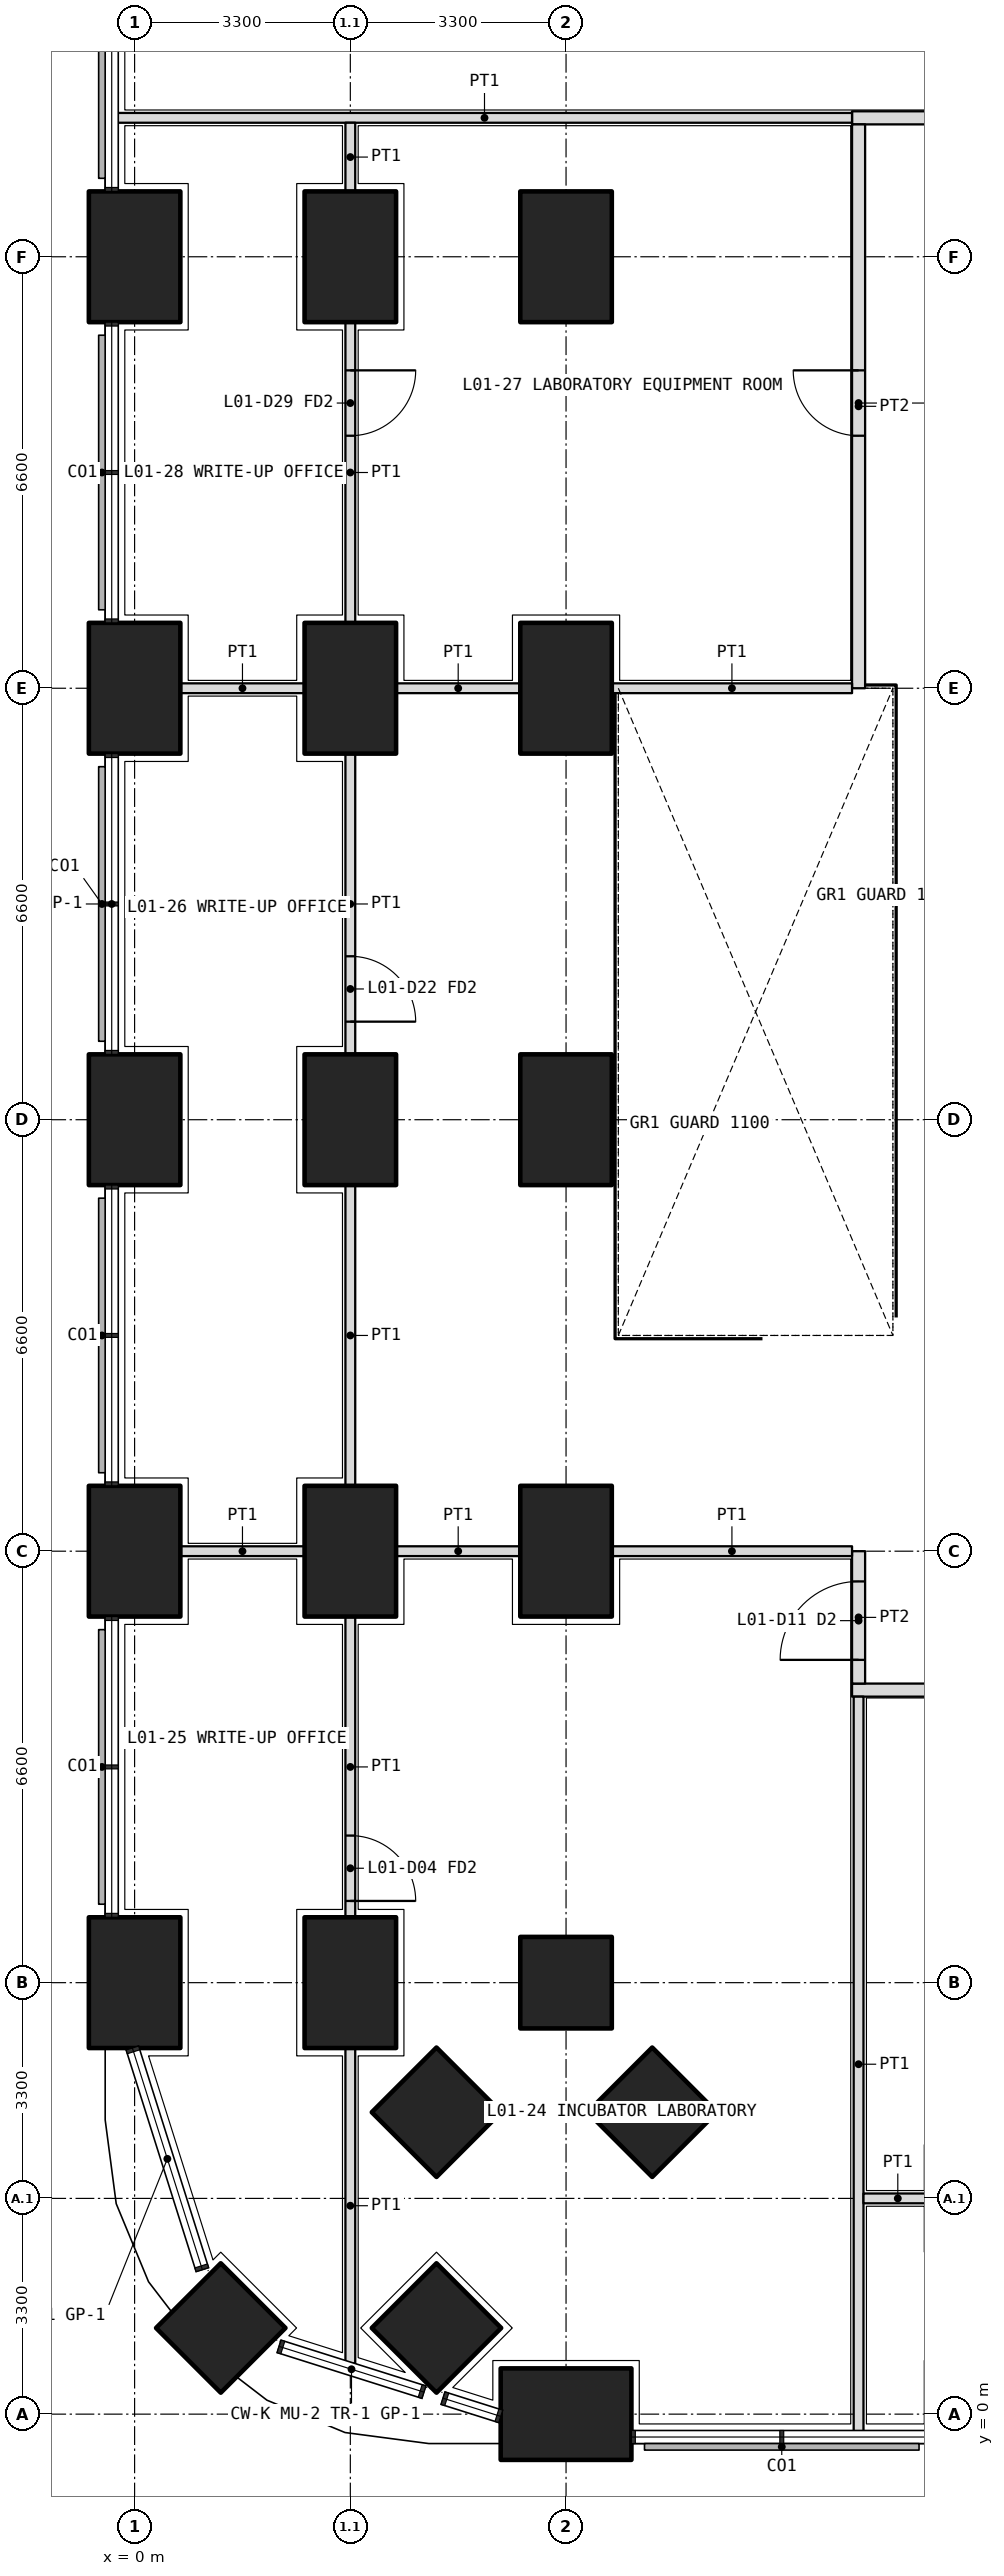
"""IFC4 building model, lengths in metres.
Left out: names, types, materials, properties, quantities, classifications, styles, units other than length and angle.
Written with IfcOpenShell. Run it as: python <this file> out.ifc"""

import sys

from ifc_helpers import new_model, si_unit, direction, frame, frame_2d, origin, origin_2d, place, context, subcontext, project, spatial, rectangle, extrude, element, fill, save


model = new_model("IFC4")
c1 = context("Model", 3, precision=1e-05, world=origin(), true_north=direction((0.0, 1.0)))
c2 = subcontext(c1, "Body", "Model", "MODEL_VIEW")
j1 = project(units=[si_unit("LENGTHUNIT", "METRE"), si_unit("PLANEANGLEUNIT", "RADIAN")], contexts=[c1])
p1 = place(None, origin())
s1 = spatial("IfcSite", under=j1, at=p1, CompositionType="ELEMENT")
p2 = place(p1, origin())
s2 = spatial("IfcBuilding", under=s1, at=p2, CompositionType="ELEMENT")
p3 = place(p2, frame((0.0, 0.0, 7.2)))
s3 = spatial("IfcBuildingStorey", under=s2, at=p3, CompositionType="ELEMENT", Elevation=7.2)
p4 = place(p3, frame((1.318, 1.318, 0.0), z_axis=(0.0, 0.0, 1.0), x_axis=(0.707106781187, 0.707106781187, 0.0)))
e1 = element("IfcColumn", 1, at=p4, inside=s3, PredefinedType="COLUMN", context=c2, shape_type="SweptSolid", body=[
    extrude(rectangle(XDim=1.4, YDim=1.4, at=origin_2d()), origin(), (0.0, 0.0, 1.0), 5.4),
])
for number, where, z_axis, x_axis in (
    (2, (6.6, 0.0, 0.0), (0.0, 0.0, 1.0), (1.0, 0.0, 0.0)),
    (3, (0.0, 6.6, 0.0), (0.0, 0.0, 1.0), (0.0, 1.0, 0.0)),
    (4, (0.0, 13.2, 0.0), (0.0, 0.0, 1.0), (0.0, 1.0, 0.0)),
    (5, (0.0, 19.8, 0.0), (0.0, 0.0, 1.0), (0.0, 1.0, 0.0)),
    (6, (0.0, 26.4, 0.0), (0.0, 0.0, 1.0), (0.0, 1.0, 0.0)),
    (7, (0.0, 33.0, 0.0), (0.0, 0.0, 1.0), (0.0, 1.0, 0.0)),
):
    element("IfcColumn", number, at=place(p3, frame(where, z_axis=z_axis, x_axis=x_axis)), inside=s3, PredefinedType="COLUMN", context=c2, shape_type="SweptSolid", body=[
        extrude(rectangle(XDim=2.0, YDim=1.4, at=origin_2d()), origin(), (0.0, 0.0, 1.0), 5.4),
    ])
for number, where, z_axis, x_axis in (
    (8, (6.6, 6.6, 0.0), (0.0, 0.0, 1.0), (1.0, 0.0, 0.0)),
    (9, (4.618, 1.318, 0.0), (0.0, 0.0, 1.0), (0.707, 0.707, 0.0)),
):
    element("IfcColumn", number, at=place(p3, frame(where, z_axis=z_axis, x_axis=x_axis)), inside=s3, PredefinedType="COLUMN", context=c2, shape_type="SweptSolid", body=[
        extrude(rectangle(XDim=1.4, YDim=1.4, at=origin_2d()), origin(), (0.0, 0.0, 1.0), 5.4),
    ])
for number, where, z_axis, x_axis in (
    (10, (3.3, 6.6, 0.0), (0.0, 0.0, 1.0), (0.0, 1.0, 0.0)),
    (11, (3.3, 13.2, 0.0), (0.0, 0.0, 1.0), (0.0, 1.0, 0.0)),
    (12, (3.3, 19.8, 0.0), (0.0, 0.0, 1.0), (0.0, 1.0, 0.0)),
    (13, (3.3, 26.4, 0.0), (0.0, 0.0, 1.0), (0.0, 1.0, 0.0)),
    (14, (3.3, 33.0, 0.0), (0.0, 0.0, 1.0), (0.0, 1.0, 0.0)),
):
    element("IfcColumn", number, at=place(p3, frame(where, z_axis=z_axis, x_axis=x_axis)), inside=s3, PredefinedType="COLUMN", context=c2, shape_type="SweptSolid", body=[
        extrude(rectangle(XDim=2.0, YDim=1.4, at=origin_2d()), origin(), (0.0, 0.0, 1.0), 5.4),
    ])
for number, where, z_axis, x_axis in (
    (15, (4.618, 4.618, 0.0), (0.0, 0.0, 1.0), (0.707, 0.707, 0.0)),
    (16, (7.918, 4.618, 0.0), (0.0, 0.0, 1.0), (0.707, 0.707, 0.0)),
):
    element("IfcColumn", number, at=place(p3, frame(where, z_axis=z_axis, x_axis=x_axis)), inside=s3, PredefinedType="COLUMN", context=c2, shape_type="SweptSolid", body=[
        extrude(rectangle(XDim=1.4, YDim=1.4, at=origin_2d()), origin(), (0.0, 0.0, 1.0), 5.4),
    ])
for number, where, z_axis, x_axis in (
    (17, (6.6, 13.2, 0.0), (0.0, 0.0, 1.0), (0.0, 1.0, 0.0)),
    (18, (6.6, 19.8, 0.0), (0.0, 0.0, 1.0), (0.0, 1.0, 0.0)),
    (19, (6.6, 26.4, 0.0), (0.0, 0.0, 1.0), (0.0, 1.0, 0.0)),
    (20, (6.6, 33.0, 0.0), (0.0, 0.0, 1.0), (0.0, 1.0, 0.0)),
):
    element("IfcColumn", number, at=place(p3, frame(where, z_axis=z_axis, x_axis=x_axis)), inside=s3, PredefinedType="COLUMN", context=c2, shape_type="SweptSolid", body=[
        extrude(rectangle(XDim=2.0, YDim=1.4, at=origin_2d()), origin(), (0.0, 0.0, 1.0), 5.4),
    ])
p5 = place(p3, frame((10.975, 11.075, 0.0), z_axis=(0.0, 0.0, 1.0), x_axis=(1.0, 0.0, 0.0)))
e21 = element("IfcWall", 21, at=p5, inside=s3, PredefinedType="PARTITIONING", context=c2, shape_type="SweptSolid", body=[
    extrude(rectangle(XDim=30.85, YDim=0.2, at=frame_2d((15.425, 0.0))), origin(), (0.0, 0.0, 1.0), 4.05),
])
p6 = place(p5, frame((3.863, 0.0, 0.0)))
e22 = element("IfcOpeningElement", 22, at=p6, cuts=e21, PredefinedType="OPENING", context=c2, shape_type="SweptSolid", body=[
    extrude(rectangle(XDim=1.2, YDim=2.1, at=frame_2d((0.6, 1.05))), frame((0.0, 0.11, 0.0), z_axis=(0.0, -1.0, 0.0), x_axis=(1.0, 0.0, 0.0)), (0.0, 0.0, 1.0), 0.22),
])
p7 = place(p5, frame((9.375, 0.0, 0.0)))
e23 = element("IfcOpeningElement", 23, at=p7, cuts=e21, PredefinedType="OPENING", context=c2, shape_type="SweptSolid", body=[
    extrude(rectangle(XDim=1.0, YDim=2.1, at=frame_2d((0.5, 1.05))), frame((0.0, 0.11, 0.0), z_axis=(0.0, -1.0, 0.0), x_axis=(1.0, 0.0, 0.0)), (0.0, 0.0, 1.0), 0.22),
])
p8 = place(p5, frame((12.475, 0.0, 0.0)))
e24 = element("IfcOpeningElement", 24, at=p8, cuts=e21, PredefinedType="OPENING", context=c2, shape_type="SweptSolid", body=[
    extrude(rectangle(XDim=0.9, YDim=2.1, at=frame_2d((0.45, 1.05))), frame((0.0, 0.11, 0.0), z_axis=(0.0, -1.0, 0.0), x_axis=(1.0, 0.0, 0.0)), (0.0, 0.0, 1.0), 0.22),
])
p9 = place(p5, frame((16.375, 0.0, 0.0)))
e25 = element("IfcOpeningElement", 25, at=p9, cuts=e21, PredefinedType="OPENING", context=c2, shape_type="SweptSolid", body=[
    extrude(rectangle(XDim=0.9, YDim=2.1, at=frame_2d((0.45, 1.05))), frame((0.0, 0.11, 0.0), z_axis=(0.0, -1.0, 0.0), x_axis=(1.0, 0.0, 0.0)), (0.0, 0.0, 1.0), 0.22),
])
p10 = place(p5, frame((19.775, 0.0, 0.0)))
e26 = element("IfcOpeningElement", 26, at=p10, cuts=e21, PredefinedType="OPENING", context=c2, shape_type="SweptSolid", body=[
    extrude(rectangle(XDim=1.2, YDim=2.1, at=frame_2d((0.6, 1.05))), frame((0.0, 0.11, 0.0), z_axis=(0.0, -1.0, 0.0), x_axis=(1.0, 0.0, 0.0)), (0.0, 0.0, 1.0), 0.22),
])
p11 = place(p5, frame((25.887, 0.0, 0.0)))
e27 = element("IfcOpeningElement", 27, at=p11, cuts=e21, PredefinedType="OPENING", context=c2, shape_type="SweptSolid", body=[
    extrude(rectangle(XDim=1.0, YDim=2.1, at=frame_2d((0.5, 1.05))), frame((0.0, 0.11, 0.0), z_axis=(0.0, -1.0, 0.0), x_axis=(1.0, 0.0, 0.0)), (0.0, 0.0, 1.0), 0.22),
])
p12 = place(p3, frame((10.975, 35.125, 0.0), z_axis=(0.0, 0.0, 1.0), x_axis=(1.0, 0.0, 0.0)))
e28 = element("IfcWall", 28, at=p12, inside=s3, PredefinedType="PARTITIONING", context=c2, shape_type="SweptSolid", body=[
    extrude(rectangle(XDim=30.85, YDim=0.2, at=frame_2d((15.425, 0.0))), origin(), (0.0, 0.0, 1.0), 4.05),
])
p13 = place(p12, frame((3.962, 0.0, 0.0)))
e29 = element("IfcOpeningElement", 29, at=p13, cuts=e28, PredefinedType="OPENING", context=c2, shape_type="SweptSolid", body=[
    extrude(rectangle(XDim=1.0, YDim=2.1, at=frame_2d((0.5, 1.05))), frame((0.0, 0.11, 0.0), z_axis=(0.0, -1.0, 0.0), x_axis=(1.0, 0.0, 0.0)), (0.0, 0.0, 1.0), 0.22),
])
p14 = place(p12, frame((14.825, 0.0, 0.0)))
e30 = element("IfcOpeningElement", 30, at=p14, cuts=e28, PredefinedType="OPENING", context=c2, shape_type="SweptSolid", body=[
    extrude(rectangle(XDim=1.2, YDim=2.1, at=frame_2d((0.6, 1.05))), frame((0.0, 0.11, 0.0), z_axis=(0.0, -1.0, 0.0), x_axis=(1.0, 0.0, 0.0)), (0.0, 0.0, 1.0), 0.22),
])
p15 = place(p12, frame((25.887, 0.0, 0.0)))
e31 = element("IfcOpeningElement", 31, at=p15, cuts=e28, PredefinedType="OPENING", context=c2, shape_type="SweptSolid", body=[
    extrude(rectangle(XDim=1.0, YDim=2.1, at=frame_2d((0.5, 1.05))), frame((0.0, 0.11, 0.0), z_axis=(0.0, -1.0, 0.0), x_axis=(1.0, 0.0, 0.0)), (0.0, 0.0, 1.0), 0.22),
])
p16 = place(p3, frame((11.075, 11.175, 0.0), z_axis=(0.0, 0.0, 1.0), x_axis=(0.0, 1.0, 0.0)))
e32 = element("IfcWall", 32, at=p16, inside=s3, PredefinedType="PARTITIONING", context=c2, shape_type="SweptSolid", body=[
    extrude(rectangle(XDim=2.025, YDim=0.2, at=frame_2d((1.012, 0.0))), origin(), (0.0, 0.0, 1.0), 4.05),
])
p17 = place(p16, frame((0.363, 0.0, 0.0)))
e33 = element("IfcOpeningElement", 33, at=p17, cuts=e32, PredefinedType="OPENING", context=c2, shape_type="SweptSolid", body=[
    extrude(rectangle(XDim=1.2, YDim=2.1, at=frame_2d((0.6, 1.05))), frame((0.0, 0.11, 0.0), z_axis=(0.0, -1.0, 0.0), x_axis=(1.0, 0.0, 0.0)), (0.0, 0.0, 1.0), 0.22),
])
p18 = place(p3, frame((11.075, 26.4, 0.0), z_axis=(0.0, 0.0, 1.0), x_axis=(0.0, 1.0, 0.0)))
e34 = element("IfcWall", 34, at=p18, inside=s3, PredefinedType="PARTITIONING", context=c2, shape_type="SweptSolid", body=[
    extrude(rectangle(XDim=8.625, YDim=0.2, at=frame_2d((4.312, 0.0))), origin(), (0.0, 0.0, 1.0), 4.05),
])
p19 = place(p18, frame((3.863, 0.0, 0.0)))
e35 = element("IfcOpeningElement", 35, at=p19, cuts=e34, PredefinedType="OPENING", context=c2, shape_type="SweptSolid", body=[
    extrude(rectangle(XDim=1.0, YDim=2.1, at=frame_2d((0.5, 1.05))), frame((0.0, 0.11, 0.0), z_axis=(0.0, -1.0, 0.0), x_axis=(1.0, 0.0, 0.0)), (0.0, 0.0, 1.0), 0.22),
])
for number, where, z_axis, x_axis in (
    (36, (11.075, -0.27, 0.0), (0.0, 0.0, 1.0), (0.0, 1.0, 0.0)),
    (37, (-0.27, 35.125, 0.0), (0.0, 0.0, 1.0), (1.0, 0.0, 0.0)),
):
    element("IfcWall", number, at=place(p3, frame(where, z_axis=z_axis, x_axis=x_axis)), inside=s3, PredefinedType="PARTITIONING", context=c2, shape_type="SweptSolid", body=[
        extrude(rectangle(XDim=11.245, YDim=0.15, at=frame_2d((5.623, 0.0))), origin(), (0.0, 0.0, 1.0), 3.9),
    ])
for number, where, z_axis, x_axis in (
    (38, (11.15, 3.3, 0.0), (0.0, 0.0, 1.0), (1.0, 0.0, 0.0)),
    (39, (3.3, 35.05, 0.0), (0.0, 0.0, 1.0), (0.0, -1.0, 0.0)),
):
    element("IfcWall", number, at=place(p3, frame(where, z_axis=z_axis, x_axis=x_axis)), inside=s3, PredefinedType="PARTITIONING", context=c2, shape_type="SweptSolid", body=[
        extrude(rectangle(XDim=1.05, YDim=0.15, at=frame_2d((0.525, 0.0))), origin(), (0.0, 0.0, 1.0), 5.1),
    ])
p20 = place(p3, frame((3.3, 32.0, 0.0), z_axis=(0.0, 0.0, 1.0), x_axis=(0.0, -1.0, 0.0)))
e40 = element("IfcWall", 40, at=p20, inside=s3, PredefinedType="PARTITIONING", context=c2, shape_type="SweptSolid", body=[
    extrude(rectangle(XDim=4.6, YDim=0.15, at=frame_2d((2.3, 0.0))), origin(), (0.0, 0.0, 1.0), 5.1),
])
p21 = place(p20, frame((0.738, 0.0, 0.0)))
e41 = element("IfcOpeningElement", 41, at=p21, cuts=e40, PredefinedType="OPENING", context=c2, shape_type="SweptSolid", body=[
    extrude(rectangle(XDim=1.0, YDim=2.1, at=frame_2d((0.5, 1.05))), frame((0.0, 0.085, 0.0), z_axis=(0.0, -1.0, 0.0), x_axis=(1.0, 0.0, 0.0)), (0.0, 0.0, 1.0), 0.17),
])
p22 = place(p3, frame((3.3, 25.4, 0.0), z_axis=(0.0, 0.0, 1.0), x_axis=(0.0, -1.0, 0.0)))
e42 = element("IfcWall", 42, at=p22, inside=s3, PredefinedType="PARTITIONING", context=c2, shape_type="SweptSolid", body=[
    extrude(rectangle(XDim=4.6, YDim=0.15, at=frame_2d((2.3, 0.0))), origin(), (0.0, 0.0, 1.0), 5.1),
])
p23 = place(p22, frame((3.1, 0.0, 0.0)))
e43 = element("IfcOpeningElement", 43, at=p23, cuts=e42, PredefinedType="OPENING", context=c2, shape_type="SweptSolid", body=[
    extrude(rectangle(XDim=1.0, YDim=2.1, at=frame_2d((0.5, 1.05))), frame((0.0, 0.085, 0.0), z_axis=(0.0, -1.0, 0.0), x_axis=(1.0, 0.0, 0.0)), (0.0, 0.0, 1.0), 0.17),
])
p24 = place(p3, frame((3.3, 18.8, 0.0), z_axis=(0.0, 0.0, 1.0), x_axis=(0.0, -1.0, 0.0)))
e44 = element("IfcWall", 44, at=p24, inside=s3, PredefinedType="PARTITIONING", context=c2, shape_type="SweptSolid", body=[
    extrude(rectangle(XDim=4.6, YDim=0.15, at=frame_2d((2.3, 0.0))), origin(), (0.0, 0.0, 1.0), 5.1),
])
p25 = place(p3, frame((3.3, 12.2, 0.0), z_axis=(0.0, 0.0, 1.0), x_axis=(0.0, -1.0, 0.0)))
e45 = element("IfcWall", 45, at=p25, inside=s3, PredefinedType="PARTITIONING", context=c2, shape_type="SweptSolid", body=[
    extrude(rectangle(XDim=4.6, YDim=0.15, at=frame_2d((2.3, 0.0))), origin(), (0.0, 0.0, 1.0), 5.1),
])
p26 = place(p25, frame((3.35, 0.0, 0.0)))
e46 = element("IfcOpeningElement", 46, at=p26, cuts=e45, PredefinedType="OPENING", context=c2, shape_type="SweptSolid", body=[
    extrude(rectangle(XDim=1.0, YDim=2.1, at=frame_2d((0.5, 1.05))), frame((0.0, 0.085, 0.0), z_axis=(0.0, -1.0, 0.0), x_axis=(1.0, 0.0, 0.0)), (0.0, 0.0, 1.0), 0.17),
])
p27 = place(p3, frame((3.3, 5.6, 0.0), z_axis=(0.0, 0.0, 1.0), x_axis=(0.0, -1.0, 0.0)))
e47 = element("IfcWall", 47, at=p27, inside=s3, PredefinedType="PARTITIONING", context=c2, shape_type="SweptSolid", body=[
    extrude(rectangle(XDim=4.824, YDim=0.15, at=frame_2d((2.412, 0.0))), origin(), (0.0, 0.0, 1.0), 3.9),
])
p28 = place(p3, frame((0.7, 13.2, 0.0), z_axis=(0.0, 0.0, 1.0), x_axis=(1.0, 0.0, 0.0)))
e48 = element("IfcWall", 48, at=p28, inside=s3, PredefinedType="PARTITIONING", context=c2, shape_type="SweptSolid", body=[
    extrude(rectangle(XDim=1.9, YDim=0.15, at=frame_2d((0.95, 0.0))), origin(), (0.0, 0.0, 1.0), 4.05),
])
p29 = place(p3, frame((4.0, 13.2, 0.0), z_axis=(0.0, 0.0, 1.0), x_axis=(1.0, 0.0, 0.0)))
e49 = element("IfcWall", 49, at=p29, inside=s3, PredefinedType="PARTITIONING", context=c2, shape_type="SweptSolid", body=[
    extrude(rectangle(XDim=1.9, YDim=0.15, at=frame_2d((0.95, 0.0))), origin(), (0.0, 0.0, 1.0), 4.05),
])
p30 = place(p3, frame((7.3, 13.2, 0.0), z_axis=(0.0, 0.0, 1.0), x_axis=(1.0, 0.0, 0.0)))
e50 = element("IfcWall", 50, at=p30, inside=s3, PredefinedType="PARTITIONING", context=c2, shape_type="SweptSolid", body=[
    extrude(rectangle(XDim=3.675, YDim=0.15, at=frame_2d((1.837, 0.0))), origin(), (0.0, 0.0, 1.0), 4.05),
])
p31 = place(p3, frame((0.7, 26.4, 0.0), z_axis=(0.0, 0.0, 1.0), x_axis=(1.0, 0.0, 0.0)))
e51 = element("IfcWall", 51, at=p31, inside=s3, PredefinedType="PARTITIONING", context=c2, shape_type="SweptSolid", body=[
    extrude(rectangle(XDim=1.9, YDim=0.15, at=frame_2d((0.95, 0.0))), origin(), (0.0, 0.0, 1.0), 4.05),
])
p32 = place(p3, frame((4.0, 26.4, 0.0), z_axis=(0.0, 0.0, 1.0), x_axis=(1.0, 0.0, 0.0)))
e52 = element("IfcWall", 52, at=p32, inside=s3, PredefinedType="PARTITIONING", context=c2, shape_type="SweptSolid", body=[
    extrude(rectangle(XDim=1.9, YDim=0.15, at=frame_2d((0.95, 0.0))), origin(), (0.0, 0.0, 1.0), 4.05),
])
p33 = place(p3, frame((7.3, 26.4, 0.0), z_axis=(0.0, 0.0, 1.0), x_axis=(1.0, 0.0, 0.0)))
e53 = element("IfcWall", 53, at=p33, inside=s3, PredefinedType="PARTITIONING", context=c2, shape_type="SweptSolid", body=[
    extrude(rectangle(XDim=3.675, YDim=0.15, at=frame_2d((1.837, 0.0))), origin(), (0.0, 0.0, 1.0), 4.05),
])
p34 = place(p17, origin())
e54 = element("IfcDoor", 54, at=p34, inside=s3, OperationType="DOUBLE_DOOR_SINGLE_SWING", PredefinedType="DOOR", context=c2, shape_type="SweptSolid", body=[
    extrude(rectangle(XDim=1.2, YDim=2.1, at=frame_2d((0.6, 1.05))), frame((0.0, 0.025, 0.0), z_axis=(0.0, -1.0, 0.0), x_axis=(1.0, 0.0, 0.0)), (0.0, 0.0, 1.0), 0.05),
])
fill(e33, e54)
p35 = place(p26, origin())
e55 = element("IfcDoor", 55, at=p35, inside=s3, OperationType="SINGLE_SWING_RIGHT", PredefinedType="DOOR", context=c2, shape_type="SweptSolid", body=[
    extrude(rectangle(XDim=1.0, YDim=2.1, at=frame_2d((0.5, 1.05))), frame((0.0, 0.025, 0.0), z_axis=(0.0, -1.0, 0.0), x_axis=(1.0, 0.0, 0.0)), (0.0, 0.0, 1.0), 0.05),
])
fill(e46, e55)
p36 = place(p23, origin())
e56 = element("IfcDoor", 56, at=p36, inside=s3, OperationType="SINGLE_SWING_RIGHT", PredefinedType="DOOR", context=c2, shape_type="SweptSolid", body=[
    extrude(rectangle(XDim=1.0, YDim=2.1, at=frame_2d((0.5, 1.05))), frame((0.0, 0.025, 0.0), z_axis=(0.0, -1.0, 0.0), x_axis=(1.0, 0.0, 0.0)), (0.0, 0.0, 1.0), 0.05),
])
fill(e43, e56)
p37 = place(p19, origin())
e57 = element("IfcDoor", 57, at=p37, inside=s3, OperationType="SINGLE_SWING_RIGHT", PredefinedType="DOOR", context=c2, shape_type="SweptSolid", body=[
    extrude(rectangle(XDim=1.0, YDim=2.1, at=frame_2d((0.5, 1.05))), frame((0.0, 0.025, 0.0), z_axis=(0.0, -1.0, 0.0), x_axis=(1.0, 0.0, 0.0)), (0.0, 0.0, 1.0), 0.05),
])
fill(e35, e57)
p38 = place(p21, origin())
e58 = element("IfcDoor", 58, at=p38, inside=s3, OperationType="SINGLE_SWING_LEFT", PredefinedType="DOOR", context=c2, shape_type="SweptSolid", body=[
    extrude(rectangle(XDim=1.0, YDim=2.1, at=frame_2d((0.5, 1.05))), frame((0.0, 0.025, 0.0), z_axis=(0.0, -1.0, 0.0), x_axis=(1.0, 0.0, 0.0)), (0.0, 0.0, 1.0), 0.05),
])
fill(e41, e58)
save(model, sys.argv[1])
